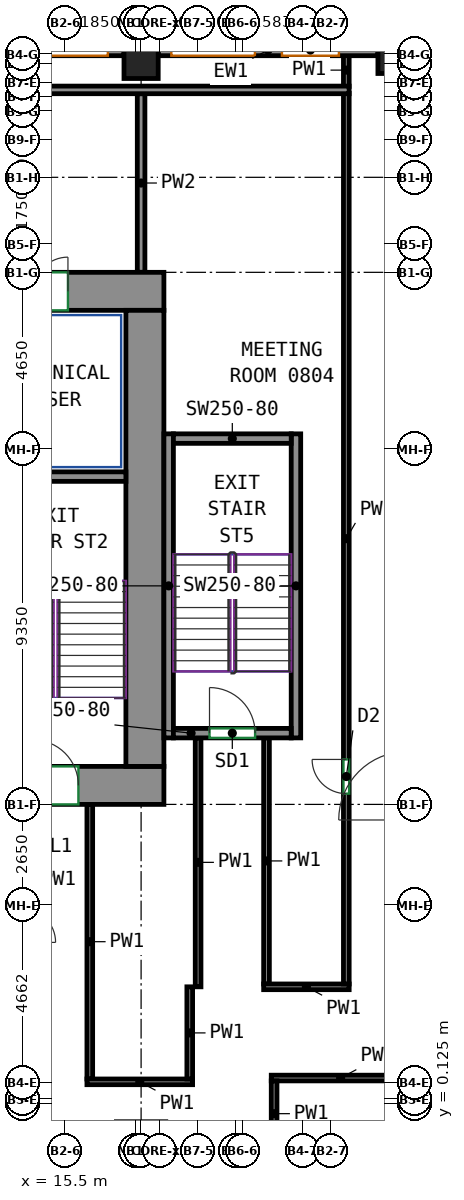
"""IFC4 building model, lengths in metres.
Left out: names, types, materials, properties, quantities, classifications, styles, units other than length and angle.
Written with IfcOpenShell. Run it as: python <this file> out.ifc"""

import sys

from ifc_helpers import new_model, si_unit, direction, frame, frame_2d, origin, origin_2d, place, context, subcontext, project, spatial, rectangle, extrude, source, transform, mapped, element, fill, save


model = new_model("IFC4")
c1 = context("Model", 3, precision=1e-05, world=origin(), true_north=direction((0.0, 1.0)))
c2 = subcontext(c1, "Body", "Model", "MODEL_VIEW")
j1 = project(units=[si_unit("LENGTHUNIT", "METRE"), si_unit("PLANEANGLEUNIT", "RADIAN")], contexts=[c1])
p1 = place(None, origin())
s1 = spatial("IfcSite", under=j1, at=p1, CompositionType="ELEMENT")
p2 = place(p1, origin())
s2 = spatial("IfcBuilding", under=s1, at=p2, CompositionType="ELEMENT")
p3 = place(p2, frame((0.0, 0.0, 39.0)))
s3 = spatial("IfcBuildingStorey", under=s2, at=p3, CompositionType="ELEMENT", Elevation=39.0)
m1 = source(origin(), c2, "Body", "SweptSolid", [
    extrude(rectangle(XDim=0.9, YDim=0.9, at=origin_2d()), origin(), (0.0, 0.0, 1.0), 3.72),
])
for number, where, z_axis, x_axis in (
    (1, (17.5, 27.55, 0.0), (0.0, 0.0, 1.0), (1.0, 0.0, 0.0)),
    (2, (24.182, 27.682, 0.0), (0.0, 0.0, 1.0), (1.0, 0.0, 0.0)),
):
    element("IfcColumn", number, at=place(p3, frame(where, z_axis=z_axis, x_axis=x_axis)), inside=s3, PredefinedType="COLUMN", context=c2, shape_type="MappedRepresentation", body=[
        mapped(m1, transform((0.0, 0.0, 0.0))),
    ])
m2 = source(origin(), c2, "Body", "SweptSolid", [
    extrude(rectangle(XDim=5.63, YDim=1.0, at=frame_2d((2.815, 0.0))), origin(), (0.0, 0.0, 1.0), 3.72),
])
p4 = place(p3, frame((12.47, 8.5, 0.0), z_axis=(0.0, 0.0, 1.0), x_axis=(1.0, 0.0, 0.0)))
e3 = element("IfcWall", 3, at=p4, inside=s3, PredefinedType="SHEAR", context=c2, shape_type="MappedRepresentation", body=[
    mapped(m2, transform((0.0, 0.0, 0.0))),
])
p5 = place(p4, frame((2.18, 0.0, 0.0)))
e4 = element("IfcOpeningElement", 4, at=p5, cuts=e3, PredefinedType="OPENING", context=c2, shape_type="SweptSolid", body=[
    extrude(rectangle(XDim=1.2, YDim=2.1, at=frame_2d((0.6, 1.05))), frame((0.0, 0.51, 0.0), z_axis=(0.0, -1.0, 0.0), x_axis=(1.0, 0.0, 0.0)), (0.0, 0.0, 1.0), 1.02),
])
m3 = source(origin(), c2, "Body", "SweptSolid", [
    extrude(rectangle(XDim=34.1, YDim=1.0, at=frame_2d((17.05, 0.0))), origin(), (0.0, 0.0, 1.0), 3.72),
])
p6 = place(p3, frame((-16.0, 21.5, 0.0), z_axis=(0.0, 0.0, 1.0), x_axis=(1.0, 0.0, 0.0)))
e5 = element("IfcWall", 5, at=p6, inside=s3, PredefinedType="SHEAR", context=c2, shape_type="MappedRepresentation", body=[
    mapped(m3, transform((0.0, 0.0, 0.0))),
])
p7 = place(p6, frame((6.108, 0.0, 0.0)))
e6 = element("IfcOpeningElement", 6, at=p7, cuts=e5, PredefinedType="OPENING", context=c2, shape_type="SweptSolid", body=[
    extrude(rectangle(XDim=0.9, YDim=2.1, at=frame_2d((0.45, 1.05))), frame((0.0, 0.51, 0.0), z_axis=(0.0, -1.0, 0.0), x_axis=(1.0, 0.0, 0.0)), (0.0, 0.0, 1.0), 1.02),
])
p8 = place(p6, frame((11.173, 0.0, 0.0)))
e7 = element("IfcOpeningElement", 7, at=p8, cuts=e5, PredefinedType="OPENING", context=c2, shape_type="SweptSolid", body=[
    extrude(rectangle(XDim=0.9, YDim=2.1, at=frame_2d((0.45, 1.05))), frame((0.0, 0.51, 0.0), z_axis=(0.0, -1.0, 0.0), x_axis=(1.0, 0.0, 0.0)), (0.0, 0.0, 1.0), 1.02),
])
p9 = place(p6, frame((16.238, 0.0, 0.0)))
e8 = element("IfcOpeningElement", 8, at=p9, cuts=e5, PredefinedType="OPENING", context=c2, shape_type="SweptSolid", body=[
    extrude(rectangle(XDim=0.9, YDim=2.1, at=frame_2d((0.45, 1.05))), frame((0.0, 0.51, 0.0), z_axis=(0.0, -1.0, 0.0), x_axis=(1.0, 0.0, 0.0)), (0.0, 0.0, 1.0), 1.02),
])
p10 = place(p6, frame((21.062, 0.0, 0.0)))
e9 = element("IfcOpeningElement", 9, at=p10, cuts=e5, PredefinedType="OPENING", context=c2, shape_type="SweptSolid", body=[
    extrude(rectangle(XDim=0.9, YDim=2.1, at=frame_2d((0.45, 1.05))), frame((0.0, 0.51, 0.0), z_axis=(0.0, -1.0, 0.0), x_axis=(1.0, 0.0, 0.0)), (0.0, 0.0, 1.0), 1.02),
])
p11 = place(p6, frame((26.489, 0.0, 0.0)))
e10 = element("IfcOpeningElement", 10, at=p11, cuts=e5, PredefinedType="OPENING", context=c2, shape_type="SweptSolid", body=[
    extrude(rectangle(XDim=0.9, YDim=2.1, at=frame_2d((0.45, 1.05))), frame((0.0, 0.51, 0.0), z_axis=(0.0, -1.0, 0.0), x_axis=(1.0, 0.0, 0.0)), (0.0, 0.0, 1.0), 1.02),
])
p12 = place(p6, frame((2.525, 0.0, 0.0)))
e11 = element("IfcOpeningElement", 11, at=p12, cuts=e5, PredefinedType="OPENING", context=c2, shape_type="SweptSolid", body=[
    extrude(rectangle(XDim=0.9, YDim=2.1, at=frame_2d((0.45, 1.05))), frame((0.0, 0.51, 0.0), z_axis=(0.0, -1.0, 0.0), x_axis=(1.0, 0.0, 0.0)), (0.0, 0.0, 1.0), 1.02),
])
p13 = place(p6, frame((30.675, 0.0, 0.0)))
e12 = element("IfcOpeningElement", 12, at=p13, cuts=e5, PredefinedType="OPENING", context=c2, shape_type="SweptSolid", body=[
    extrude(rectangle(XDim=0.9, YDim=2.1, at=frame_2d((0.45, 1.05))), frame((0.0, 0.51, 0.0), z_axis=(0.0, -1.0, 0.0), x_axis=(1.0, 0.0, 0.0)), (0.0, 0.0, 1.0), 1.02),
])
m4 = source(origin(), c2, "Body", "SweptSolid", [
    extrude(rectangle(XDim=12.0, YDim=1.0, at=frame_2d((6.0, 0.0))), origin(), (0.0, 0.0, 1.0), 3.72),
])
p14 = place(p3, frame((17.6, 9.0, 0.0), z_axis=(0.0, 0.0, 1.0), x_axis=(0.0, 1.0, 0.0)))
e13 = element("IfcWall", 13, at=p14, inside=s3, PredefinedType="SHEAR", context=c2, shape_type="MappedRepresentation", body=[
    mapped(m4, transform((0.0, 0.0, 0.0))),
])
m5 = source(origin(), c2, "Body", "SweptSolid", [
    extrude(rectangle(XDim=3.7, YDim=0.25, at=frame_2d((1.85, 0.0))), origin(), (0.0, 0.0, 1.0), 3.72),
])
p15 = place(p3, frame((13.4, 16.625, 0.0), z_axis=(0.0, 0.0, 1.0), x_axis=(1.0, 0.0, 0.0)))
e14 = element("IfcWall", 14, at=p15, inside=s3, PredefinedType="SHEAR", context=c2, shape_type="MappedRepresentation", body=[
    mapped(m5, transform((0.0, 0.0, 0.0))),
])
m6 = source(origin(), c2, "Body", "SweptSolid", [
    extrude(rectangle(XDim=8.0, YDim=0.25, at=frame_2d((4.0, 0.0))), origin(), (0.0, 0.0, 1.0), 3.72),
])
for number, where, z_axis, x_axis in (
    (15, (18.225, 9.75, 0.0), (0.0, 0.0, 1.0), (0.0, 1.0, 0.0)),
    (16, (21.575, 9.75, 0.0), (0.0, 0.0, 1.0), (0.0, 1.0, 0.0)),
):
    element("IfcWall", number, at=place(p3, frame(where, z_axis=z_axis, x_axis=x_axis)), inside=s3, PredefinedType="SHEAR", context=c2, shape_type="MappedRepresentation", body=[
        mapped(m6, transform((0.0, 0.0, 0.0))),
    ])
m7 = source(origin(), c2, "Body", "SweptSolid", [
    extrude(rectangle(XDim=3.1, YDim=0.25, at=frame_2d((1.55, 0.0))), origin(), (0.0, 0.0, 1.0), 3.72),
])
p16 = place(p3, frame((18.35, 9.875, 0.0), z_axis=(0.0, 0.0, 1.0), x_axis=(1.0, 0.0, 0.0)))
e17 = element("IfcWall", 17, at=p16, inside=s3, PredefinedType="SHEAR", context=c2, shape_type="MappedRepresentation", body=[
    mapped(m7, transform((0.0, 0.0, 0.0))),
])
p17 = place(p16, frame((0.95, 0.0, 0.0)))
e18 = element("IfcOpeningElement", 18, at=p17, cuts=e17, PredefinedType="OPENING", context=c2, shape_type="SweptSolid", body=[
    extrude(rectangle(XDim=1.2, YDim=2.1, at=frame_2d((0.6, 1.05))), frame((0.0, 0.135, 0.0), z_axis=(0.0, -1.0, 0.0), x_axis=(1.0, 0.0, 0.0)), (0.0, 0.0, 1.0), 0.27),
])
p18 = place(p3, frame((18.35, 17.625, 0.0), z_axis=(0.0, 0.0, 1.0), x_axis=(1.0, 0.0, 0.0)))
e19 = element("IfcWall", 19, at=p18, inside=s3, PredefinedType="SHEAR", context=c2, shape_type="MappedRepresentation", body=[
    mapped(m7, transform((0.0, 0.0, 0.0))),
])
m8 = source(origin(), c2, "Body", "SweptSolid", [
    extrude(rectangle(XDim=5.782, YDim=0.3, at=frame_2d((2.891, 0.0))), origin(), (0.0, 0.0, 1.0), 3.72),
])
p19 = place(p3, frame((23.732, 27.85, 0.0), z_axis=(0.0, 0.0, 1.0), x_axis=(-1.0, 0.0, 0.0)))
e20 = element("IfcWall", 20, at=p19, inside=s3, PredefinedType="SOLIDWALL", context=c2, shape_type="MappedRepresentation", body=[
    mapped(m8, transform((0.0, 0.0, 0.0))),
])
p20 = place(p19, frame((1.026, 0.0, 0.7)))
e21 = element("IfcOpeningElement", 21, at=p20, cuts=e20, PredefinedType="OPENING", context=c2, shape_type="SweptSolid", body=[
    extrude(rectangle(XDim=1.5, YDim=2.25, at=frame_2d((0.75, 1.125))), frame((0.0, 0.16, 0.0), z_axis=(0.0, -1.0, 0.0), x_axis=(1.0, 0.0, 0.0)), (0.0, 0.0, 1.0), 0.32),
])
p21 = place(p19, frame((3.236, 0.0, 0.7)))
e22 = element("IfcOpeningElement", 22, at=p21, cuts=e20, PredefinedType="OPENING", context=c2, shape_type="SweptSolid", body=[
    extrude(rectangle(XDim=2.2, YDim=2.25, at=frame_2d((1.1, 1.125))), frame((0.0, 0.16, 0.0), z_axis=(0.0, -1.0, 0.0), x_axis=(1.0, 0.0, 0.0)), (0.0, 0.0, 1.0), 0.32),
])
m9 = source(origin(), c2, "Body", "SweptSolid", [
    extrude(rectangle(XDim=6.1, YDim=0.3, at=frame_2d((3.05, 0.0))), origin(), (0.0, 0.0, 1.0), 3.72),
])
p22 = place(p3, frame((17.05, 27.85, 0.0), z_axis=(0.0, 0.0, 1.0), x_axis=(-1.0, 0.0, 0.0)))
e23 = element("IfcWall", 23, at=p22, inside=s3, PredefinedType="SOLIDWALL", context=c2, shape_type="MappedRepresentation", body=[
    mapped(m9, transform((0.0, 0.0, 0.0))),
])
p23 = place(p22, frame((0.425, 0.0, 0.7)))
e24 = element("IfcOpeningElement", 24, at=p23, cuts=e23, PredefinedType="OPENING", context=c2, shape_type="SweptSolid", body=[
    extrude(rectangle(XDim=2.2, YDim=2.25, at=frame_2d((1.1, 1.125))), frame((0.0, 0.16, 0.0), z_axis=(0.0, -1.0, 0.0), x_axis=(1.0, 0.0, 0.0)), (0.0, 0.0, 1.0), 0.32),
])
p24 = place(p22, frame((3.475, 0.0, 0.7)))
e25 = element("IfcOpeningElement", 25, at=p24, cuts=e23, PredefinedType="OPENING", context=c2, shape_type="SweptSolid", body=[
    extrude(rectangle(XDim=2.2, YDim=2.25, at=frame_2d((1.1, 1.125))), frame((0.0, 0.16, 0.0), z_axis=(0.0, -1.0, 0.0), x_axis=(1.0, 0.0, 0.0)), (0.0, 0.0, 1.0), 0.32),
])
p25 = place(p3, frame((16.15, 0.775, 0.0), z_axis=(0.0, 0.0, 1.0), x_axis=(0.0, 1.0, 0.0)))
e26 = element("IfcWall", 26, at=p25, inside=s3, PredefinedType="PARTITIONING", context=c2, shape_type="SweptSolid", body=[
    extrude(rectangle(XDim=7.225, YDim=0.15, at=frame_2d((3.613, 0.0))), origin(), (0.0, 0.0, 1.0), 3.72),
])
p26 = place(p3, frame((16.075, 0.7, 0.0), z_axis=(0.0, 0.0, 1.0), x_axis=(1.0, 0.0, 0.0)))
e27 = element("IfcWall", 27, at=p26, inside=s3, PredefinedType="PARTITIONING", context=c2, shape_type="SweptSolid", body=[
    extrude(rectangle(XDim=2.78, YDim=0.15, at=frame_2d((1.39, 0.0))), origin(), (0.0, 0.0, 1.0), 3.72),
])
p27 = place(p3, frame((18.78, 3.2, 0.0), z_axis=(0.0, 0.0, 1.0), x_axis=(0.0, -1.0, 0.0)))
e28 = element("IfcWall", 28, at=p27, inside=s3, PredefinedType="PARTITIONING", context=c2, shape_type="SweptSolid", body=[
    extrude(rectangle(XDim=2.425, YDim=0.15, at=frame_2d((1.212, 0.0))), origin(), (0.0, 0.0, 1.0), 3.72),
])
p28 = place(p3, frame((19.0, 9.75, 0.0), z_axis=(0.0, 0.0, 1.0), x_axis=(0.0, -1.0, 0.0)))
e29 = element("IfcWall", 29, at=p28, inside=s3, PredefinedType="PARTITIONING", context=c2, shape_type="SweptSolid", body=[
    extrude(rectangle(XDim=6.55, YDim=0.15, at=frame_2d((3.275, 0.0))), origin(), (0.0, 0.0, 1.0), 3.72),
])
p29 = place(p3, frame((20.8, 3.275, 0.0), z_axis=(0.0, 0.0, 1.0), x_axis=(0.0, 1.0, 0.0)))
e30 = element("IfcWall", 30, at=p29, inside=s3, PredefinedType="PARTITIONING", context=c2, shape_type="SweptSolid", body=[
    extrude(rectangle(XDim=6.475, YDim=0.15, at=frame_2d((3.238, 0.0))), origin(), (0.0, 0.0, 1.0), 3.72),
])
p30 = place(p3, frame((20.725, 3.2, 0.0), z_axis=(0.0, 0.0, 1.0), x_axis=(1.0, 0.0, 0.0)))
e31 = element("IfcWall", 31, at=p30, inside=s3, PredefinedType="PARTITIONING", context=c2, shape_type="SweptSolid", body=[
    extrude(rectangle(XDim=2.25, YDim=0.15, at=frame_2d((1.125, 0.0))), origin(), (0.0, 0.0, 1.0), 3.72),
])
p31 = place(p3, frame((22.9, 3.275, 0.0), z_axis=(0.0, 0.0, 1.0), x_axis=(0.0, 1.0, 0.0)))
e32 = element("IfcWall", 32, at=p31, inside=s3, PredefinedType="PARTITIONING", context=c2, shape_type="SweptSolid", body=[
    extrude(rectangle(XDim=23.435, YDim=0.15, at=frame_2d((11.718, 0.0))), origin(), (0.0, 0.0, 1.0), 3.72),
])
p32 = place(p31, frame((5.008, 0.0, 0.0)))
e33 = element("IfcOpeningElement", 33, at=p32, cuts=e32, PredefinedType="OPENING", context=c2, shape_type="SweptSolid", body=[
    extrude(rectangle(XDim=0.9, YDim=2.1, at=frame_2d((0.45, 1.05))), frame((0.0, 0.085, 0.0), z_axis=(0.0, -1.0, 0.0), x_axis=(1.0, 0.0, 0.0)), (0.0, 0.0, 1.0), 0.17),
])
p33 = place(p3, frame((20.925, 0.8, 0.0), z_axis=(0.0, 0.0, 1.0), x_axis=(1.0, 0.0, 0.0)))
e34 = element("IfcWall", 34, at=p33, inside=s3, PredefinedType="PARTITIONING", context=c2, shape_type="SweptSolid", body=[
    extrude(rectangle(XDim=3.65, YDim=0.15, at=frame_2d((1.825, 0.0))), origin(), (0.0, 0.0, 1.0), 3.72),
])
p34 = place(p3, frame((21.0, -1.0, 0.0), z_axis=(0.0, 0.0, 1.0), x_axis=(0.0, 1.0, 0.0)))
e35 = element("IfcWall", 35, at=p34, inside=s3, PredefinedType="PARTITIONING", context=c2, shape_type="SweptSolid", body=[
    extrude(rectangle(XDim=1.725, YDim=0.15, at=frame_2d((0.863, 0.0))), origin(), (0.0, 0.0, 1.0), 3.72),
])
p35 = place(p3, frame((22.9, 26.891, 0.0), z_axis=(0.0, 0.0, 1.0), x_axis=(0.0, 1.0, 0.0)))
e36 = element("IfcWall", 36, at=p35, inside=s3, PredefinedType="PARTITIONING", context=c2, shape_type="SweptSolid", body=[
    extrude(rectangle(XDim=0.859, YDim=0.15, at=frame_2d((0.429, 0.0))), origin(), (0.0, 0.0, 1.0), 3.72),
])
p36 = place(p3, frame((17.5, 22.0, 0.0), z_axis=(0.0, 0.0, 1.0), x_axis=(0.0, 1.0, 0.0)))
e37 = element("IfcWall", 37, at=p36, inside=s3, PredefinedType="PARTITIONING", context=c2, shape_type="SweptSolid", body=[
    extrude(rectangle(XDim=4.7, YDim=0.2, at=frame_2d((2.35, 0.0))), origin(), (0.0, 0.0, 1.0), 3.72),
])
p37 = place(p3, frame((-20.874, 26.8, 0.0), z_axis=(0.0, 0.0, 1.0), x_axis=(1.0, 0.0, 0.0)))
e38 = element("IfcWall", 38, at=p37, inside=s3, PredefinedType="PARTITIONING", context=c2, shape_type="SweptSolid", body=[
    extrude(rectangle(XDim=43.848, YDim=0.2, at=frame_2d((21.924, 0.0))), origin(), (0.0, 0.0, 1.0), 3.72),
])
p38 = place(p37, frame((31.863, 0.0, 0.0)))
e39 = element("IfcOpeningElement", 39, at=p38, cuts=e38, PredefinedType="OPENING", context=c2, shape_type="SweptSolid", body=[
    extrude(rectangle(XDim=1.0, YDim=2.1, at=frame_2d((0.5, 1.05))), frame((0.0, 0.11, 0.0), z_axis=(0.0, -1.0, 0.0), x_axis=(1.0, 0.0, 0.0)), (0.0, 0.0, 1.0), 0.22),
])
p39 = place(p13, origin())
e40 = element("IfcDoor", 40, at=p39, inside=s3, OperationType="SINGLE_SWING_RIGHT", PredefinedType="DOOR", context=c2, shape_type="SweptSolid", body=[
    extrude(rectangle(XDim=0.9, YDim=2.1, at=frame_2d((0.45, 1.05))), frame((0.0, -0.355, 0.0), z_axis=(0.0, -1.0, 0.0), x_axis=(1.0, 0.0, 0.0)), (0.0, 0.0, 1.0), 0.05),
])
fill(e12, e40)
p40 = place(p5, origin())
e41 = element("IfcDoor", 41, at=p40, inside=s3, OperationType="DOUBLE_DOOR_SINGLE_SWING", PredefinedType="DOOR", context=c2, shape_type="SweptSolid", body=[
    extrude(rectangle(XDim=1.2, YDim=2.1, at=frame_2d((0.6, 1.05))), frame((0.0, 0.405, 0.0), z_axis=(0.0, -1.0, 0.0), x_axis=(1.0, 0.0, 0.0)), (0.0, 0.0, 1.0), 0.05),
])
fill(e4, e41)
p41 = place(p17, origin())
e42 = element("IfcDoor", 42, at=p41, inside=s3, OperationType="DOUBLE_DOOR_SINGLE_SWING", PredefinedType="DOOR", context=c2, shape_type="SweptSolid", body=[
    extrude(rectangle(XDim=1.2, YDim=2.1, at=frame_2d((0.6, 1.05))), frame((0.0, 0.025, 0.0), z_axis=(0.0, -1.0, 0.0), x_axis=(1.0, 0.0, 0.0)), (0.0, 0.0, 1.0), 0.05),
])
fill(e18, e42)
p42 = place(p32, origin())
e43 = element("IfcDoor", 43, at=p42, inside=s3, OperationType="SINGLE_SWING_RIGHT", PredefinedType="DOOR", context=c2, shape_type="SweptSolid", body=[
    extrude(rectangle(XDim=0.9, YDim=2.1, at=frame_2d((0.45, 1.05))), frame((0.0, 0.025, 0.0), z_axis=(0.0, -1.0, 0.0), x_axis=(1.0, 0.0, 0.0)), (0.0, 0.0, 1.0), 0.05),
])
fill(e33, e43)
save(model, sys.argv[1])
